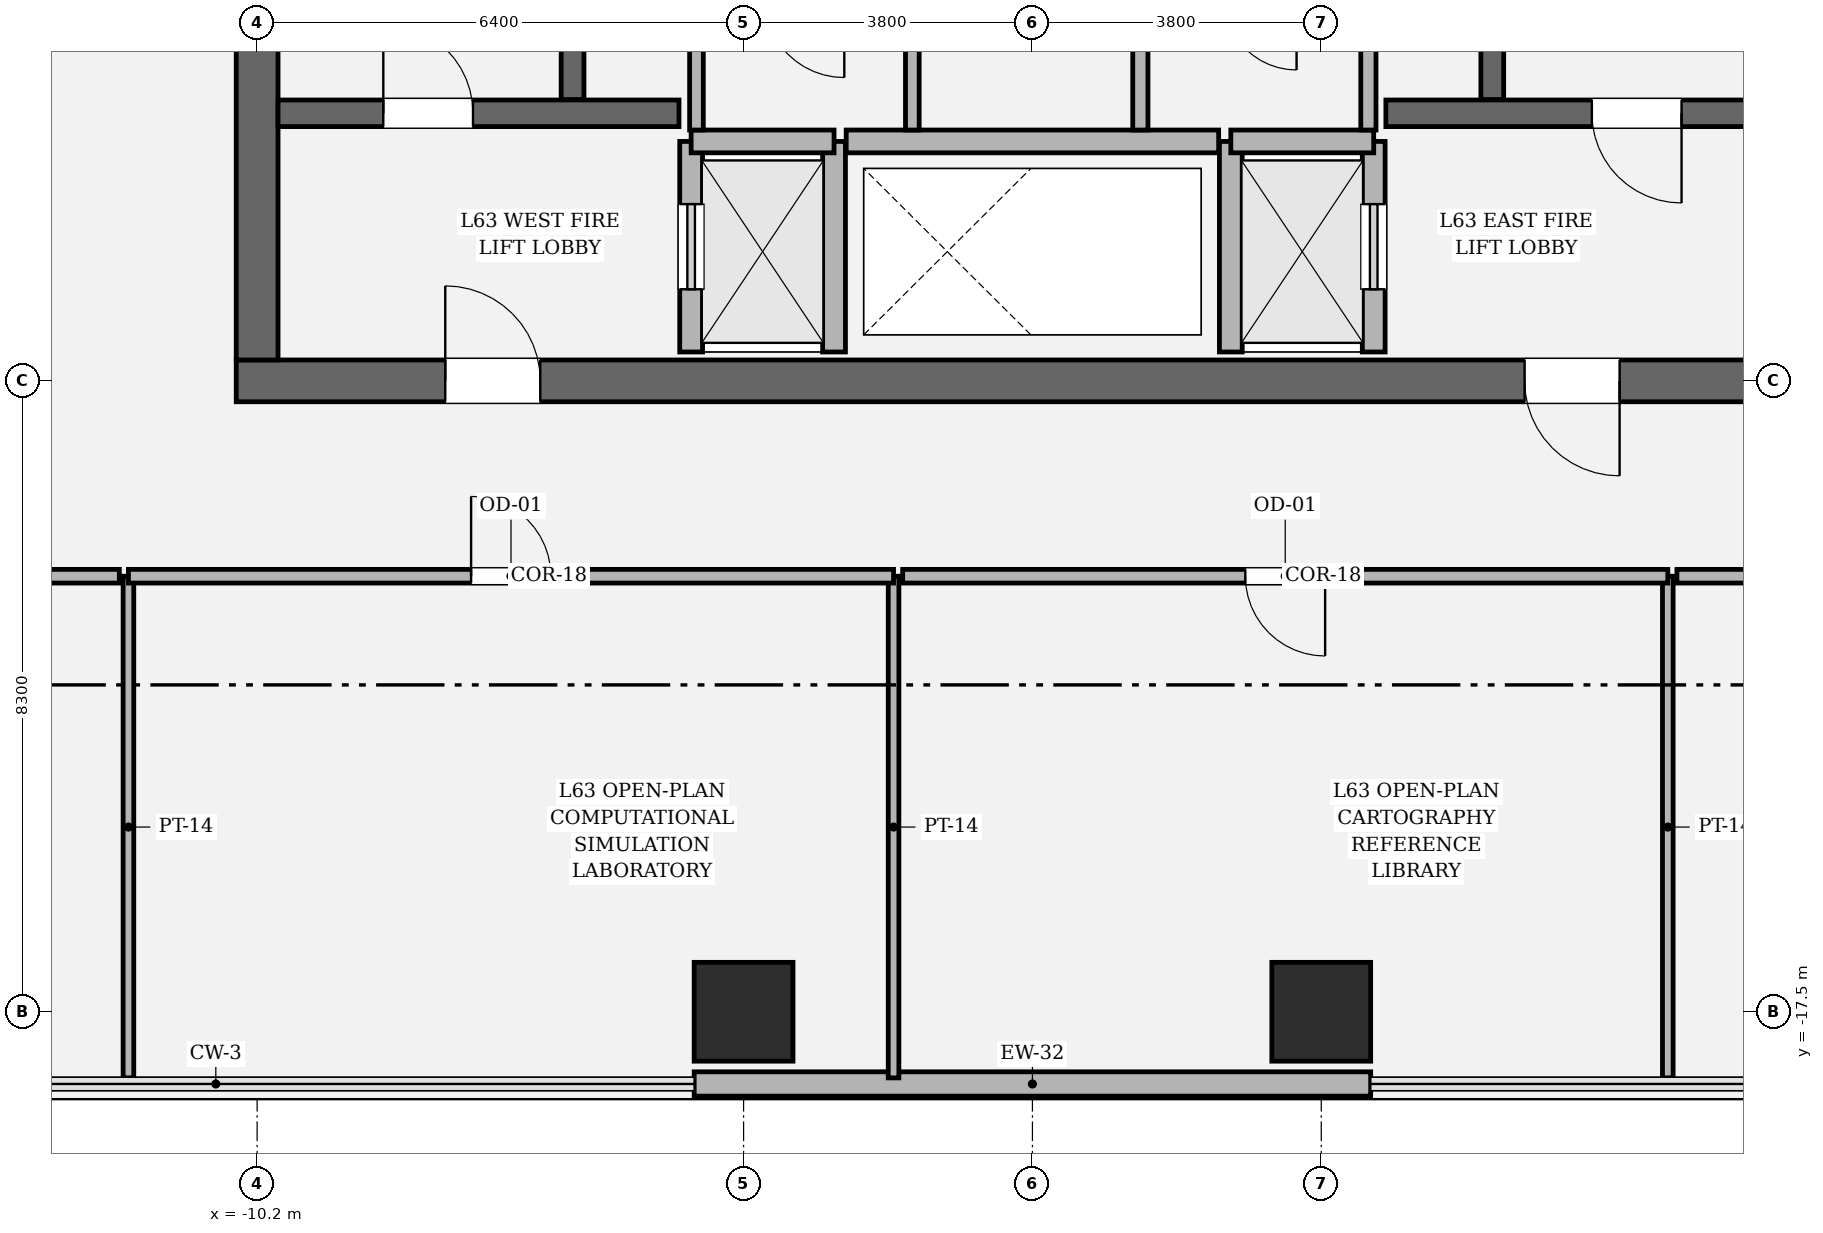
"""IFC4 building model, lengths in metres.
Left out: names, types, materials, properties, quantities, classifications, styles, units other than length and angle.
Written with IfcOpenShell. Run it as: python <this file> out.ifc"""

import sys

from ifc_helpers import new_model, si_unit, direction, frame, frame_2d, origin, origin_2d, place, context, subcontext, project, spatial, rectangle, hollow_rectangle, extrude, element, fill, save


model = new_model("IFC4")
c1 = context("Model", 3, precision=1e-05, world=origin(), true_north=direction((0.0, 1.0)))
c2 = subcontext(c1, "Body", "Model", "MODEL_VIEW")
j1 = project(units=[si_unit("LENGTHUNIT", "METRE"), si_unit("PLANEANGLEUNIT", "RADIAN")], contexts=[c1])
p1 = place(None, origin())
s1 = spatial("IfcSite", under=j1, at=p1, CompositionType="ELEMENT")
p2 = place(p1, origin())
s2 = spatial("IfcBuilding", under=s1, at=p2, CompositionType="ELEMENT")
p3 = place(p2, frame((0.0, 0.0, 267.6)))
s3 = spatial("IfcBuildingStorey", under=s2, at=p3, CompositionType="ELEMENT", Elevation=267.6)
p4 = place(p3, frame((10.475, -9.2, 0.0), z_axis=(0.0, 0.0, 1.0), x_axis=(-1.0, 0.0, 0.0)))
e1 = element("IfcWall", 1, at=p4, inside=s3, PredefinedType="SHEAR", context=c2, shape_type="SweptSolid", body=[
    extrude(rectangle(XDim=20.95, YDim=0.55, at=frame_2d((10.475, 0.0))), origin(), (0.0, 0.0, 1.0), 4.05),
])
p5 = place(p4, frame((2.75, 0.0, 0.0)))
e2 = element("IfcOpeningElement", 2, at=p5, cuts=e1, PredefinedType="OPENING", context=c2, shape_type="SweptSolid", body=[
    extrude(rectangle(XDim=1.25, YDim=2.25, at=frame_2d((0.625, 1.125))), frame((0.0, 0.285, 0.0), z_axis=(0.0, -1.0, 0.0), x_axis=(1.0, 0.0, 0.0)), (0.0, 0.0, 1.0), 0.57),
])
p6 = place(p4, frame((16.95, 0.0, 0.0)))
e3 = element("IfcOpeningElement", 3, at=p6, cuts=e1, PredefinedType="OPENING", context=c2, shape_type="SweptSolid", body=[
    extrude(rectangle(XDim=1.25, YDim=2.25, at=frame_2d((0.625, 1.125))), frame((0.0, 0.285, 0.0), z_axis=(0.0, -1.0, 0.0), x_axis=(1.0, 0.0, 0.0)), (0.0, 0.0, 1.0), 0.57),
])
p7 = place(p3, frame((-10.2, -8.925, 0.0), z_axis=(0.0, 0.0, 1.0), x_axis=(0.0, 1.0, 0.0)))
e4 = element("IfcWall", 4, at=p7, inside=s3, PredefinedType="SHEAR", context=c2, shape_type="SweptSolid", body=[
    extrude(rectangle(XDim=17.85, YDim=0.55, at=frame_2d((8.925, 0.0))), origin(), (0.0, 0.0, 1.0), 4.05),
])
p8 = place(p7, frame((12.715, 0.0, 0.0)))
e5 = element("IfcOpeningElement", 5, at=p8, cuts=e4, PredefinedType="OPENING", context=c2, shape_type="SweptSolid", body=[
    extrude(rectangle(XDim=1.18, YDim=2.2, at=frame_2d((0.59, 1.1))), frame((0.0, 0.285, 0.0), z_axis=(0.0, -1.0, 0.0), x_axis=(1.0, 0.0, 0.0)), (0.0, 0.0, 1.0), 0.57),
])
for number, where, z_axis, x_axis in (
    (6, (-6.05, -5.5, 0.0), (0.0, 0.0, 1.0), (0.0, 1.0, 0.0)),
    (7, (6.05, 3.45, 0.0), (0.0, 0.0, 1.0), (0.0, -1.0, 0.0)),
):
    element("IfcWall", number, at=place(p3, frame(where, z_axis=z_axis, x_axis=x_axis)), inside=s3, PredefinedType="SOLIDWALL", context=c2, shape_type="SweptSolid", body=[
        extrude(rectangle(XDim=8.95, YDim=0.3, at=frame_2d((4.475, 0.0))), origin(), (0.0, 0.0, 1.0), 4.05),
    ])
p9 = place(p3, frame((-9.925, -5.68, 0.0), z_axis=(0.0, 0.0, 1.0), x_axis=(1.0, 0.0, 0.0)))
e8 = element("IfcWall", 8, at=p9, inside=s3, PredefinedType="SOLIDWALL", context=c2, shape_type="SweptSolid", body=[
    extrude(rectangle(XDim=5.275, YDim=0.35, at=frame_2d((2.638, 0.0))), origin(), (0.0, 0.0, 1.0), 4.05),
])
p10 = place(p9, frame((1.385, 0.0, 0.0)))
e9 = element("IfcOpeningElement", 9, at=p10, cuts=e8, PredefinedType="OPENING", context=c2, shape_type="SweptSolid", body=[
    extrude(rectangle(XDim=1.18, YDim=2.2, at=frame_2d((0.59, 1.1))), frame((0.0, 0.185, 0.0), z_axis=(0.0, -1.0, 0.0), x_axis=(1.0, 0.0, 0.0)), (0.0, 0.0, 1.0), 0.37),
])
p11 = place(p3, frame((4.65, -5.68, 0.0), z_axis=(0.0, 0.0, 1.0), x_axis=(1.0, 0.0, 0.0)))
e10 = element("IfcWall", 10, at=p11, inside=s3, PredefinedType="SOLIDWALL", context=c2, shape_type="SweptSolid", body=[
    extrude(rectangle(XDim=5.275, YDim=0.35, at=frame_2d((2.638, 0.0))), origin(), (0.0, 0.0, 1.0), 4.05),
])
p12 = place(p11, frame((2.71, 0.0, 0.0)))
e11 = element("IfcOpeningElement", 11, at=p12, cuts=e10, PredefinedType="OPENING", context=c2, shape_type="SweptSolid", body=[
    extrude(rectangle(XDim=1.18, YDim=2.2, at=frame_2d((0.59, 1.1))), frame((0.0, 0.185, 0.0), z_axis=(0.0, -1.0, 0.0), x_axis=(1.0, 0.0, 0.0)), (0.0, 0.0, 1.0), 0.37),
])
for number, where, z_axis, x_axis in (
    (12, (-3.8, -17.5, 0.0), (0.0, 0.0, 1.0), (1.0, 0.0, 0.0)),
    (13, (3.8, -17.5, 0.0), (0.0, 0.0, 1.0), (1.0, 0.0, 0.0)),
):
    element("IfcColumn", number, at=place(p3, frame(where, z_axis=z_axis, x_axis=x_axis)), inside=s3, PredefinedType="COLUMN", context=c2, shape_type="SweptSolid", body=[
        extrude(hollow_rectangle(XDim=1.3, YDim=1.3, WallThickness=0.038, at=origin_2d()), origin(), (0.0, 0.0, 1.0), 4.05),
    ])
p13 = place(p3, frame((-4.45, -18.45, 0.0), z_axis=(0.0, 0.0, 1.0), x_axis=(1.0, 0.0, 0.0)))
e14 = element("IfcWall", 14, at=p13, inside=s3, PredefinedType="SOLIDWALL", context=c2, shape_type="SweptSolid", body=[
    extrude(rectangle(XDim=8.9, YDim=0.32, at=frame_2d((4.45, 0.0))), origin(), (0.0, 0.0, 1.0), 3.85),
])
p14 = place(p3, frame((-4.49, -8.82, 0.0), z_axis=(0.0, 0.0, 1.0), x_axis=(0.0, 1.0, 0.0)))
e15 = element("IfcWall", 15, at=p14, inside=s3, PredefinedType="SOLIDWALL", context=c2, shape_type="SweptSolid", body=[
    extrude(rectangle(XDim=2.77, YDim=0.3, at=frame_2d((1.385, 0.0))), origin(), (0.0, 0.0, 1.0), 3.85),
])
p15 = place(p14, frame((0.825, 0.0, 0.0)))
e16 = element("IfcOpeningElement", 16, at=p15, cuts=e15, PredefinedType="OPENING", context=c2, shape_type="SweptSolid", body=[
    extrude(rectangle(XDim=1.12, YDim=2.25, at=frame_2d((0.56, 1.125))), frame((0.0, 0.16, 0.0), z_axis=(0.0, -1.0, 0.0), x_axis=(1.0, 0.0, 0.0)), (0.0, 0.0, 1.0), 0.32),
])
p16 = place(p3, frame((-2.61, -8.82, 0.0), z_axis=(0.0, 0.0, 1.0), x_axis=(0.0, 1.0, 0.0)))
e17 = element("IfcWall", 17, at=p16, inside=s3, PredefinedType="SOLIDWALL", context=c2, shape_type="SweptSolid", body=[
    extrude(rectangle(XDim=2.77, YDim=0.3, at=frame_2d((1.385, 0.0))), origin(), (0.0, 0.0, 1.0), 3.85),
])
p17 = place(p3, frame((-4.49, -6.05, 0.0), z_axis=(0.0, 0.0, 1.0), x_axis=(1.0, 0.0, 0.0)))
e18 = element("IfcWall", 18, at=p17, inside=s3, PredefinedType="SOLIDWALL", context=c2, shape_type="SweptSolid", body=[
    extrude(rectangle(XDim=1.88, YDim=0.3, at=frame_2d((0.94, 0.0))), origin(), (0.0, 0.0, 1.0), 3.85),
])
p18 = place(p3, frame((4.49, -8.82, 0.0), z_axis=(0.0, 0.0, 1.0), x_axis=(0.0, 1.0, 0.0)))
e19 = element("IfcWall", 19, at=p18, inside=s3, PredefinedType="SOLIDWALL", context=c2, shape_type="SweptSolid", body=[
    extrude(rectangle(XDim=2.77, YDim=0.3, at=frame_2d((1.385, 0.0))), origin(), (0.0, 0.0, 1.0), 3.85),
])
p19 = place(p18, frame((0.825, 0.0, 0.0)))
e20 = element("IfcOpeningElement", 20, at=p19, cuts=e19, PredefinedType="OPENING", context=c2, shape_type="SweptSolid", body=[
    extrude(rectangle(XDim=1.12, YDim=2.25, at=frame_2d((0.56, 1.125))), frame((0.0, 0.16, 0.0), z_axis=(0.0, -1.0, 0.0), x_axis=(1.0, 0.0, 0.0)), (0.0, 0.0, 1.0), 0.32),
])
p20 = place(p3, frame((2.61, -8.82, 0.0), z_axis=(0.0, 0.0, 1.0), x_axis=(0.0, 1.0, 0.0)))
e21 = element("IfcWall", 21, at=p20, inside=s3, PredefinedType="SOLIDWALL", context=c2, shape_type="SweptSolid", body=[
    extrude(rectangle(XDim=2.77, YDim=0.3, at=frame_2d((1.385, 0.0))), origin(), (0.0, 0.0, 1.0), 3.85),
])
p21 = place(p3, frame((2.61, -6.05, 0.0), z_axis=(0.0, 0.0, 1.0), x_axis=(1.0, 0.0, 0.0)))
e22 = element("IfcWall", 22, at=p21, inside=s3, PredefinedType="SOLIDWALL", context=c2, shape_type="SweptSolid", body=[
    extrude(rectangle(XDim=1.88, YDim=0.3, at=frame_2d((0.94, 0.0))), origin(), (0.0, 0.0, 1.0), 3.85),
])
p22 = place(p3, frame((-2.45, -6.05, 0.0), z_axis=(0.0, 0.0, 1.0), x_axis=(1.0, 0.0, 0.0)))
e23 = element("IfcWall", 23, at=p22, inside=s3, PredefinedType="SOLIDWALL", context=c2, shape_type="SweptSolid", body=[
    extrude(rectangle(XDim=4.9, YDim=0.3, at=frame_2d((2.45, 0.0))), origin(), (0.0, 0.0, 1.0), 3.85),
])
for number, where, z_axis, x_axis in (
    (24, (-1.58, -5.9, 0.0), (0.0, 0.0, 1.0), (0.0, 1.0, 0.0)),
    (25, (-4.42, -4.16, 0.0), (0.0, 0.0, 1.0), (0.0, -1.0, 0.0)),
):
    element("IfcWall", number, at=place(p3, frame(where, z_axis=z_axis, x_axis=x_axis)), inside=s3, PredefinedType="PARTITIONING", context=c2, shape_type="SweptSolid", body=[
        extrude(rectangle(XDim=1.74, YDim=0.18, at=frame_2d((0.87, 0.0))), origin(), (0.0, 0.0, 1.0), 3.85),
    ])
for number, where, z_axis, x_axis in (
    (26, (1.42, -5.9, 0.0), (0.0, 0.0, 1.0), (0.0, 1.0, 0.0)),
    (27, (4.42, -5.9, 0.0), (0.0, 0.0, 1.0), (0.0, 1.0, 0.0)),
):
    element("IfcWall", number, at=place(p3, frame(where, z_axis=z_axis, x_axis=x_axis)), inside=s3, PredefinedType="SOLIDWALL", context=c2, shape_type="SweptSolid", body=[
        extrude(rectangle(XDim=1.74, YDim=0.2, at=frame_2d((0.87, 0.0))), origin(), (0.0, 0.0, 1.0), 3.85),
    ])
for number, where, z_axis, x_axis in (
    (28, (-1.827, -11.77, 0.0), (0.0, 0.0, 1.0), (0.0, -1.0, 0.0)),
    (29, (-11.893, -18.37, 0.0), (0.0, 0.0, 1.0), (0.0, 1.0, 0.0)),
):
    element("IfcWall", number, at=place(p3, frame(where, z_axis=z_axis, x_axis=x_axis)), inside=s3, PredefinedType="PARTITIONING", context=c2, shape_type="SweptSolid", body=[
        extrude(rectangle(XDim=6.6, YDim=0.14, at=frame_2d((3.3, 0.0))), origin(), (0.0, 0.0, 1.0), 3.244),
    ])
p23 = place(p3, frame((-11.893, -11.77, 0.0), z_axis=(0.0, 0.0, 1.0), x_axis=(1.0, 0.0, 0.0)))
e30 = element("IfcWall", 30, at=p23, inside=s3, PredefinedType="PARTITIONING", context=c2, shape_type="SweptSolid", body=[
    extrude(rectangle(XDim=10.066, YDim=0.18, at=frame_2d((5.033, 0.0))), origin(), (0.0, 0.0, 1.0), 3.244),
])
p24 = place(p23, frame((4.508, 0.0, 0.0)))
e31 = element("IfcOpeningElement", 31, at=p24, cuts=e30, PredefinedType="OPENING", context=c2, shape_type="SweptSolid", body=[
    extrude(rectangle(XDim=1.05, YDim=2.2, at=frame_2d((0.525, 1.1))), frame((0.0, 0.1, 0.0), z_axis=(0.0, -1.0, 0.0), x_axis=(1.0, 0.0, 0.0)), (0.0, 0.0, 1.0), 0.2),
])
p25 = place(p3, frame((8.359, -11.77, 0.0), z_axis=(0.0, 0.0, 1.0), x_axis=(0.0, -1.0, 0.0)))
e32 = element("IfcWall", 32, at=p25, inside=s3, PredefinedType="PARTITIONING", context=c2, shape_type="SweptSolid", body=[
    extrude(rectangle(XDim=6.6, YDim=0.14, at=frame_2d((3.3, 0.0))), origin(), (0.0, 0.0, 1.0), 3.244),
])
p26 = place(p3, frame((-1.707, -11.77, 0.0), z_axis=(0.0, 0.0, 1.0), x_axis=(1.0, 0.0, 0.0)))
e33 = element("IfcWall", 33, at=p26, inside=s3, PredefinedType="PARTITIONING", context=c2, shape_type="SweptSolid", body=[
    extrude(rectangle(XDim=10.066, YDim=0.18, at=frame_2d((5.033, 0.0))), origin(), (0.0, 0.0, 1.0), 3.244),
])
p27 = place(p26, frame((4.508, 0.0, 0.0)))
e34 = element("IfcOpeningElement", 34, at=p27, cuts=e33, PredefinedType="OPENING", context=c2, shape_type="SweptSolid", body=[
    extrude(rectangle(XDim=1.05, YDim=2.2, at=frame_2d((0.525, 1.1))), frame((0.0, 0.1, 0.0), z_axis=(0.0, -1.0, 0.0), x_axis=(1.0, 0.0, 0.0)), (0.0, 0.0, 1.0), 0.2),
])
p28 = place(p3, frame((-16.27, -11.77, 0.0), z_axis=(0.0, 0.0, 1.0), x_axis=(1.0, 0.0, 0.0)))
e35 = element("IfcWall", 35, at=p28, inside=s3, PredefinedType="PARTITIONING", context=c2, shape_type="SweptSolid", body=[
    extrude(rectangle(XDim=4.257, YDim=0.18, at=frame_2d((2.128, 0.0))), origin(), (0.0, 0.0, 1.0), 3.484),
])
p29 = place(p28, frame((1.604, 0.0, 0.0)))
e36 = element("IfcOpeningElement", 36, at=p29, cuts=e35, PredefinedType="OPENING", context=c2, shape_type="SweptSolid", body=[
    extrude(rectangle(XDim=1.05, YDim=2.2, at=frame_2d((0.525, 1.1))), frame((0.0, 0.1, 0.0), z_axis=(0.0, -1.0, 0.0), x_axis=(1.0, 0.0, 0.0)), (0.0, 0.0, 1.0), 0.2),
])
p30 = place(p3, frame((8.479, -11.77, 0.0), z_axis=(0.0, 0.0, 1.0), x_axis=(1.0, 0.0, 0.0)))
e37 = element("IfcWall", 37, at=p30, inside=s3, PredefinedType="PARTITIONING", context=c2, shape_type="SweptSolid", body=[
    extrude(rectangle(XDim=4.291, YDim=0.18, at=frame_2d((2.146, 0.0))), origin(), (0.0, 0.0, 1.0), 3.244),
])
p31 = place(p30, frame((1.621, 0.0, 0.0)))
e38 = element("IfcOpeningElement", 38, at=p31, cuts=e37, PredefinedType="OPENING", context=c2, shape_type="SweptSolid", body=[
    extrude(rectangle(XDim=1.05, YDim=2.2, at=frame_2d((0.525, 1.1))), frame((0.0, 0.1, 0.0), z_axis=(0.0, -1.0, 0.0), x_axis=(1.0, 0.0, 0.0)), (0.0, 0.0, 1.0), 0.2),
])
p32 = place(p10, origin())
e39 = element("IfcDoor", 39, at=p32, inside=s3, OperationType="SINGLE_SWING_LEFT", PredefinedType="DOOR", context=c2, shape_type="SweptSolid", body=[
    extrude(rectangle(XDim=1.18, YDim=2.2, at=frame_2d((0.59, 1.1))), frame((0.0, 0.025, 0.0), z_axis=(0.0, -1.0, 0.0), x_axis=(1.0, 0.0, 0.0)), (0.0, 0.0, 1.0), 0.05),
])
fill(e9, e39)
p33 = place(p12, origin())
e40 = element("IfcDoor", 40, at=p33, inside=s3, OperationType="SINGLE_SWING_RIGHT", PredefinedType="DOOR", context=c2, shape_type="SweptSolid", body=[
    extrude(rectangle(XDim=1.18, YDim=2.2, at=frame_2d((0.59, 1.1))), frame((0.0, 0.025, 0.0), z_axis=(0.0, -1.0, 0.0), x_axis=(1.0, 0.0, 0.0)), (0.0, 0.0, 1.0), 0.05),
])
fill(e11, e40)
p34 = place(p5, origin())
e41 = element("IfcDoor", 41, at=p34, inside=s3, OperationType="SINGLE_SWING_LEFT", PredefinedType="DOOR", context=c2, shape_type="SweptSolid", body=[
    extrude(rectangle(XDim=1.25, YDim=2.25, at=frame_2d((0.625, 1.125))), frame((0.0, 0.025, 0.0), z_axis=(0.0, -1.0, 0.0), x_axis=(1.0, 0.0, 0.0)), (0.0, 0.0, 1.0), 0.05),
])
fill(e2, e41)
p35 = place(p6, origin())
e42 = element("IfcDoor", 42, at=p35, inside=s3, OperationType="SINGLE_SWING_RIGHT", PredefinedType="DOOR", context=c2, shape_type="SweptSolid", body=[
    extrude(rectangle(XDim=1.25, YDim=2.25, at=frame_2d((0.625, 1.125))), frame((0.0, 0.025, 0.0), z_axis=(0.0, -1.0, 0.0), x_axis=(1.0, 0.0, 0.0)), (0.0, 0.0, 1.0), 0.05),
])
fill(e3, e42)
p36 = place(p15, origin())
e43 = element("IfcDoor", 43, at=p36, inside=s3, OperationType="SLIDING_TO_LEFT", PredefinedType="DOOR", context=c2, shape_type="SweptSolid", body=[
    extrude(rectangle(XDim=1.12, YDim=2.25, at=frame_2d((0.56, 1.125))), frame((0.0, 0.025, 0.0), z_axis=(0.0, -1.0, 0.0), x_axis=(1.0, 0.0, 0.0)), (0.0, 0.0, 1.0), 0.05),
])
fill(e16, e43)
p37 = place(p19, origin())
e44 = element("IfcDoor", 44, at=p37, inside=s3, OperationType="SLIDING_TO_RIGHT", PredefinedType="DOOR", context=c2, shape_type="SweptSolid", body=[
    extrude(rectangle(XDim=1.12, YDim=2.25, at=frame_2d((0.56, 1.125))), frame((0.0, 0.025, 0.0), z_axis=(0.0, -1.0, 0.0), x_axis=(1.0, 0.0, 0.0)), (0.0, 0.0, 1.0), 0.05),
])
fill(e20, e44)
p38 = place(p24, origin())
e45 = element("IfcDoor", 45, at=p38, inside=s3, OperationType="SINGLE_SWING_LEFT", PredefinedType="DOOR", context=c2, shape_type="SweptSolid", body=[
    extrude(rectangle(XDim=1.05, YDim=2.2, at=frame_2d((0.525, 1.1))), frame((0.0, 0.025, 0.0), z_axis=(0.0, -1.0, 0.0), x_axis=(1.0, 0.0, 0.0)), (0.0, 0.0, 1.0), 0.05),
])
fill(e31, e45)
p39 = place(p27, origin())
e46 = element("IfcDoor", 46, at=p39, inside=s3, OperationType="SINGLE_SWING_RIGHT", PredefinedType="DOOR", context=c2, shape_type="SweptSolid", body=[
    extrude(rectangle(XDim=1.05, YDim=2.2, at=frame_2d((0.525, 1.1))), frame((0.0, 0.025, 0.0), z_axis=(0.0, -1.0, 0.0), x_axis=(1.0, 0.0, 0.0)), (0.0, 0.0, 1.0), 0.05),
])
fill(e34, e46)
save(model, sys.argv[1])
